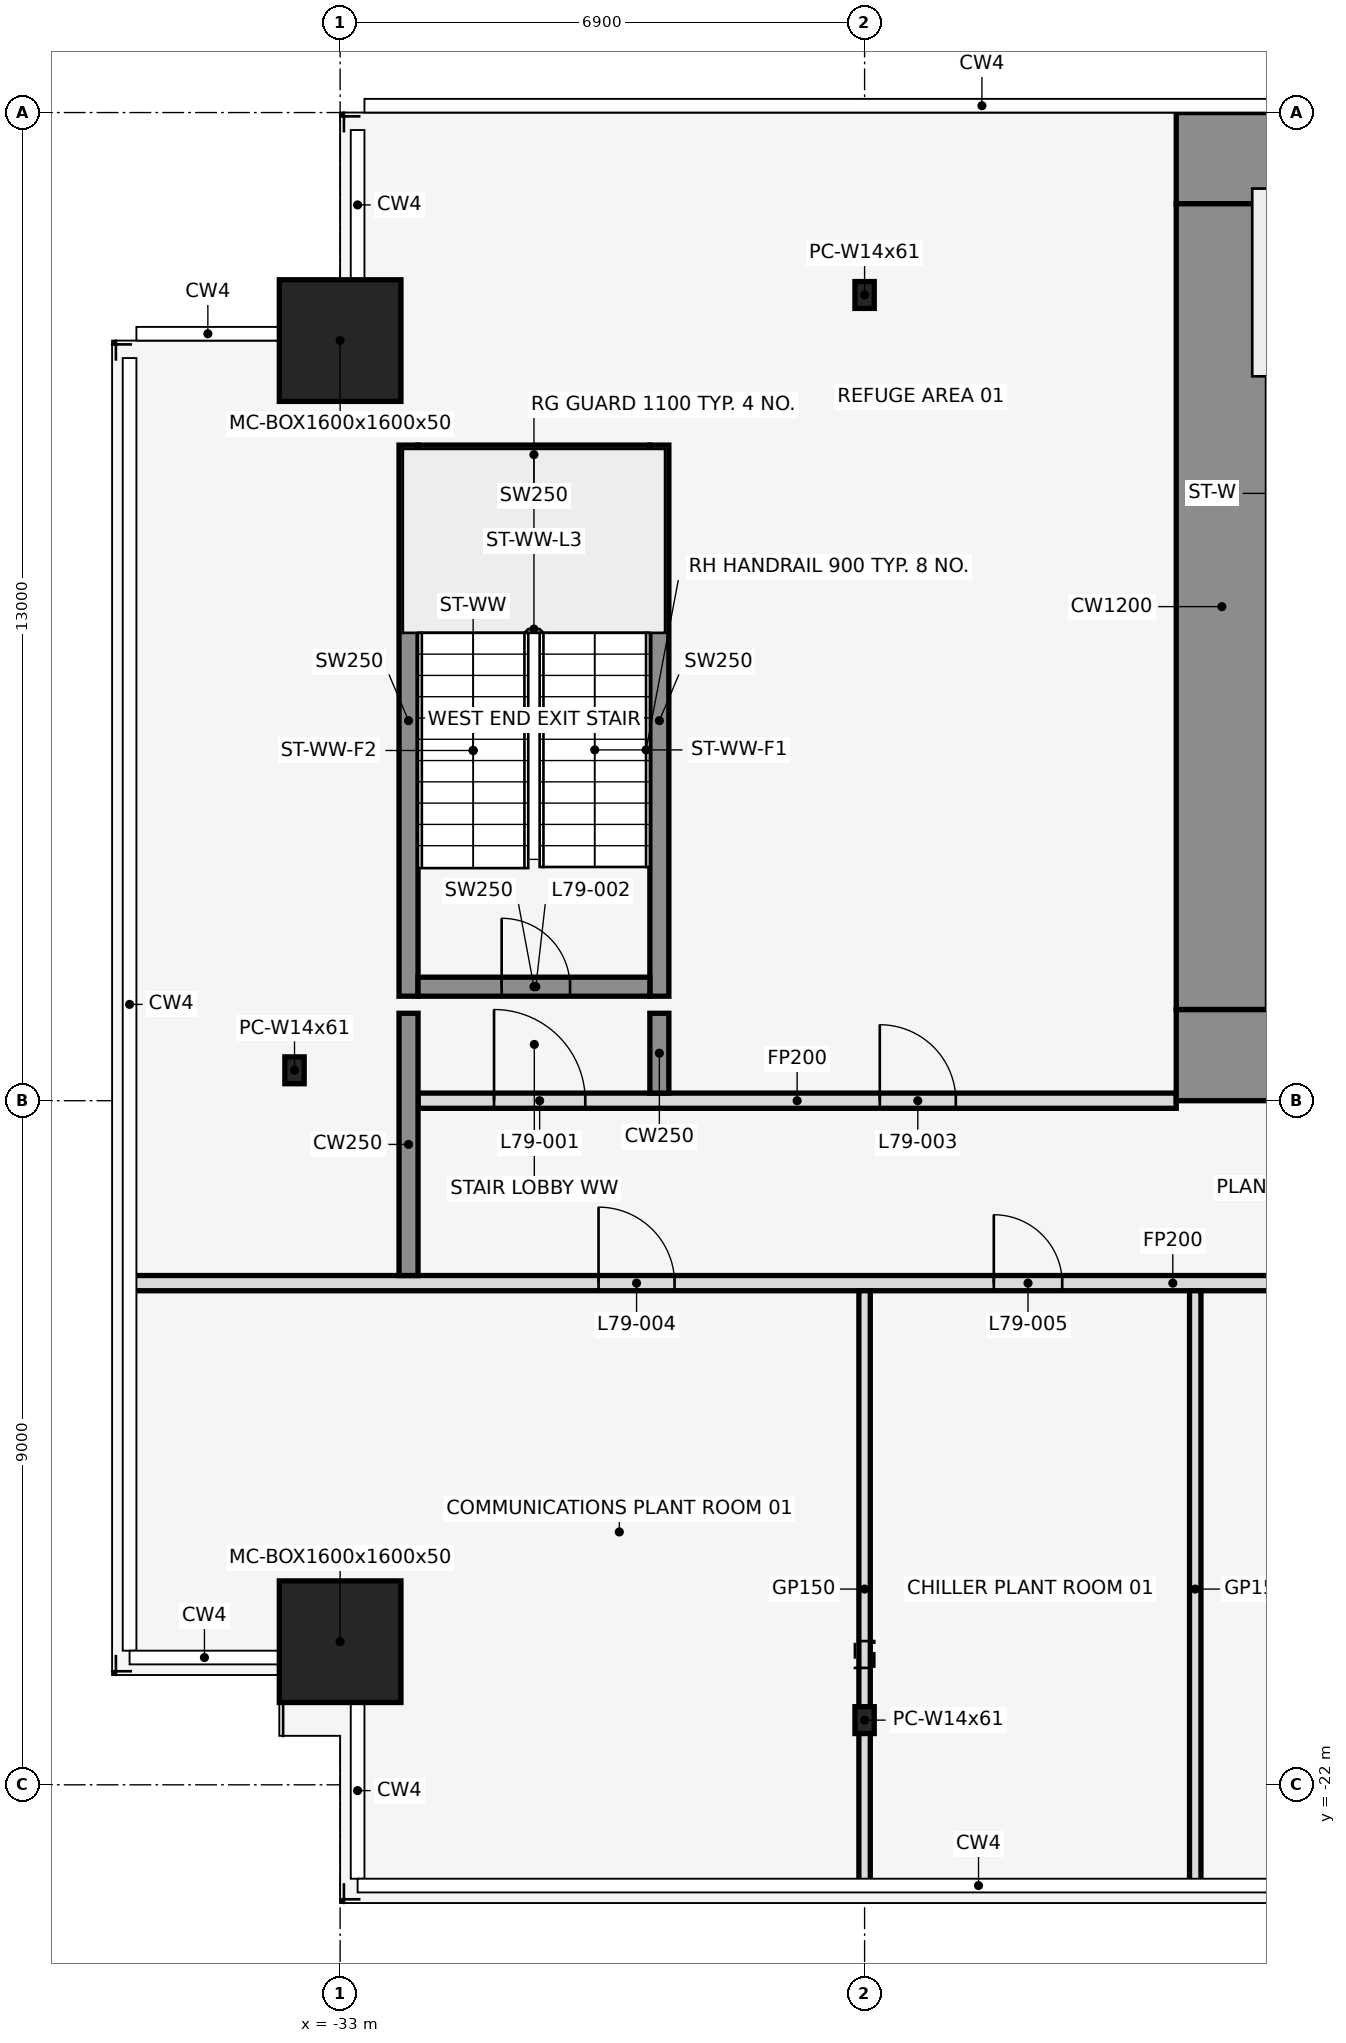
"""IFC4 building model, lengths in metres.
Left out: names, types, materials, properties, quantities, classifications, styles, units other than length and angle.
Written with IfcOpenShell. Run it as: python <this file> out.ifc"""

import sys

from ifc_helpers import new_model, si_unit, direction, frame, frame_2d, origin, origin_2d, place, context, subcontext, project, spatial, rectangle, hollow_rectangle, i_section, extrude, element, fill, save


model = new_model("IFC4")
c1 = context("Model", 3, precision=1e-05, world=origin(), true_north=direction((0.0, 1.0)))
c2 = subcontext(c1, "Body", "Model", "MODEL_VIEW")
j1 = project(units=[si_unit("LENGTHUNIT", "METRE"), si_unit("PLANEANGLEUNIT", "RADIAN")], contexts=[c1])
p1 = place(None, origin())
s1 = spatial("IfcSite", under=j1, at=p1, CompositionType="ELEMENT")
p2 = place(p1, origin())
s2 = spatial("IfcBuilding", under=s1, at=p2, CompositionType="ELEMENT")
p3 = place(p2, frame((0.0, 0.0, 352.4)))
s3 = spatial("IfcBuildingStorey", under=s2, at=p3, CompositionType="ELEMENT", Elevation=352.4)
for number, where, z_axis, x_axis in (
    (1, (-33.0, -20.117, 0.0), (0.0, 0.0, 1.0), (1.0, 0.0, 0.0)),
    (2, (-33.0, -3.0, 0.0), (0.0, 0.0, 1.0), (1.0, 0.0, 0.0)),
):
    element("IfcColumn", number, at=place(p3, frame(where, z_axis=z_axis, x_axis=x_axis)), inside=s3, PredefinedType="COLUMN", context=c2, shape_type="SweptSolid", body=[
        extrude(hollow_rectangle(XDim=1.6, YDim=1.6, WallThickness=0.05, at=origin_2d()), origin(), (0.0, 0.0, 1.0), 4.5),
    ])
p4 = place(p3, frame((-26.1, -21.149, 0.034), z_axis=(0.0, 0.191206783257, 0.981549777666), x_axis=(-1.0, 0.0, 0.0)))
e3 = element("IfcColumn", 3, at=p4, inside=s3, PredefinedType="COLUMN", context=c2, shape_type="SweptSolid", body=[
    extrude(i_section(OverallWidth=0.254, OverallDepth=0.353, WebThickness=0.01, FlangeThickness=0.016, at=origin_2d()), origin(), (0.0, 0.0, 1.0), 4.516),
])
for number, where, z_axis, x_axis in (
    (4, (-26.1, -2.4, 0.0), (0.0, 0.0, 1.0), (1.0, 0.0, 0.0)),
    (5, (-33.6, -12.6, 0.0), (0.0, 0.0, 1.0), (1.0, 0.0, 0.0)),
):
    element("IfcColumn", number, at=place(p3, frame(where, z_axis=z_axis, x_axis=x_axis)), inside=s3, PredefinedType="COLUMN", context=c2, shape_type="SweptSolid", body=[
        extrude(i_section(OverallWidth=0.254, OverallDepth=0.353, WebThickness=0.01, FlangeThickness=0.016, at=origin_2d()), origin(), (0.0, 0.0, 1.0), 4.5),
    ])
for number, where, z_axis, x_axis in (
    (6, (-32.1, -11.625, 0.0), (0.0, 0.0, 1.0), (0.0, 1.0, 0.0)),
    (7, (-28.8, -11.625, 0.0), (0.0, 0.0, 1.0), (0.0, 1.0, 0.0)),
):
    element("IfcWall", number, at=place(p3, frame(where, z_axis=z_axis, x_axis=x_axis)), inside=s3, PredefinedType="SHEAR", context=c2, shape_type="SweptSolid", body=[
        extrude(rectangle(XDim=7.25, YDim=0.25, at=frame_2d((3.625, 0.0))), origin(), (0.0, 0.0, 1.0), 4.5),
    ])
p5 = place(p3, frame((-31.975, -11.5, 0.0), z_axis=(0.0, 0.0, 1.0), x_axis=(1.0, 0.0, 0.0)))
e8 = element("IfcWall", 8, at=p5, inside=s3, PredefinedType="SHEAR", context=c2, shape_type="SweptSolid", body=[
    extrude(rectangle(XDim=3.05, YDim=0.25, at=frame_2d((1.525, 0.0))), origin(), (0.0, 0.0, 1.0), 4.5),
])
p6 = place(p5, frame((1.1, 0.0, 0.0)))
e9 = element("IfcOpeningElement", 9, at=p6, cuts=e8, PredefinedType="OPENING", context=c2, shape_type="SweptSolid", body=[
    extrude(rectangle(XDim=0.9, YDim=2.1, at=frame_2d((0.45, 1.05))), frame((0.0, 0.137, 0.0), z_axis=(0.0, -1.0, 0.0), x_axis=(1.0, 0.0, 0.0)), (0.0, 0.0, 1.0), 0.274),
])
p7 = place(p3, frame((-31.975, -4.5, 0.0), z_axis=(0.0, 0.0, 1.0), x_axis=(1.0, 0.0, 0.0)))
e10 = element("IfcWall", 10, at=p7, inside=s3, PredefinedType="SHEAR", context=c2, shape_type="SweptSolid", body=[
    extrude(rectangle(XDim=3.05, YDim=0.25, at=frame_2d((1.525, 0.0))), origin(), (0.0, 0.0, 1.0), 4.5),
])
p8 = place(p3, frame((-35.79, -15.4, 0.0), z_axis=(0.0, 0.0, 1.0), x_axis=(1.0, 0.0, 0.0)))
e11 = element("IfcWall", 11, at=p8, inside=s3, PredefinedType="PARTITIONING", context=c2, shape_type="SweptSolid", body=[
    extrude(rectangle(XDim=27.49, YDim=0.2, at=frame_2d((13.745, 0.0))), origin(), (0.0, 0.0, 1.0), 3.368),
])
p9 = place(p8, frame((6.19, 0.0, 0.0)))
e12 = element("IfcOpeningElement", 12, at=p9, cuts=e11, PredefinedType="OPENING", context=c2, shape_type="SweptSolid", body=[
    extrude(rectangle(XDim=1.0, YDim=2.1, at=frame_2d((0.5, 1.05))), frame((0.0, 0.112, 0.0), z_axis=(0.0, -1.0, 0.0), x_axis=(1.0, 0.0, 0.0)), (0.0, 0.0, 1.0), 0.224),
])
p10 = place(p8, frame((11.39, 0.0, 0.0)))
e13 = element("IfcOpeningElement", 13, at=p10, cuts=e11, PredefinedType="OPENING", context=c2, shape_type="SweptSolid", body=[
    extrude(rectangle(XDim=0.9, YDim=2.1, at=frame_2d((0.45, 1.05))), frame((0.0, 0.112, 0.0), z_axis=(0.0, -1.0, 0.0), x_axis=(1.0, 0.0, 0.0)), (0.0, 0.0, 1.0), 0.224),
])
p11 = place(p8, frame((20.04, 0.0, 0.0)))
e14 = element("IfcOpeningElement", 14, at=p11, cuts=e11, PredefinedType="OPENING", context=c2, shape_type="SweptSolid", body=[
    extrude(rectangle(XDim=1.0, YDim=2.1, at=frame_2d((0.5, 1.05))), frame((0.0, 0.112, 0.0), z_axis=(0.0, -1.0, 0.0), x_axis=(1.0, 0.0, 0.0)), (0.0, 0.0, 1.0), 0.224),
])
p12 = place(p3, frame((-31.975, -13.0, 0.0), z_axis=(0.0, 0.0, 1.0), x_axis=(1.0, 0.0, 0.0)))
e15 = element("IfcWall", 15, at=p12, inside=s3, PredefinedType="PARTITIONING", context=c2, shape_type="SweptSolid", body=[
    extrude(rectangle(XDim=9.975, YDim=0.2, at=frame_2d((4.988, 0.0))), origin(), (0.0, 0.0, 1.0), 3.368),
])
p13 = place(p12, frame((1.0, 0.0, 0.0)))
e16 = element("IfcOpeningElement", 16, at=p13, cuts=e15, PredefinedType="OPENING", context=c2, shape_type="SweptSolid", body=[
    extrude(rectangle(XDim=1.2, YDim=2.1, at=frame_2d((0.6, 1.05))), frame((0.0, 0.112, 0.0), z_axis=(0.0, -1.0, 0.0), x_axis=(1.0, 0.0, 0.0)), (0.0, 0.0, 1.0), 0.224),
])
p14 = place(p12, frame((6.075, 0.0, 0.0)))
e17 = element("IfcOpeningElement", 17, at=p14, cuts=e15, PredefinedType="OPENING", context=c2, shape_type="SweptSolid", body=[
    extrude(rectangle(XDim=1.0, YDim=2.1, at=frame_2d((0.5, 1.05))), frame((0.0, 0.112, 0.0), z_axis=(0.0, -1.0, 0.0), x_axis=(1.0, 0.0, 0.0)), (0.0, 0.0, 1.0), 0.224),
])
p15 = place(p3, frame((-32.1, -15.3, 0.0), z_axis=(0.0, 0.0, 1.0), x_axis=(0.0, 1.0, 0.0)))
e18 = element("IfcWall", 18, at=p15, inside=s3, PredefinedType="SHEAR", context=c2, shape_type="SweptSolid", body=[
    extrude(rectangle(XDim=3.45, YDim=0.25, at=frame_2d((1.725, 0.0))), origin(), (0.0, 0.0, 1.0), 4.5),
])
p16 = place(p3, frame((-28.8, -12.9, 0.0), z_axis=(0.0, 0.0, 1.0), x_axis=(0.0, 1.0, 0.0)))
e19 = element("IfcWall", 19, at=p16, inside=s3, PredefinedType="SHEAR", context=c2, shape_type="SweptSolid", body=[
    extrude(rectangle(XDim=1.05, YDim=0.25, at=frame_2d((0.525, 0.0))), origin(), (0.0, 0.0, 1.0), 4.5),
])
for number, where, z_axis, x_axis in (
    (20, (-26.1, -23.35, 0.0), (0.0, 0.0, 1.0), (0.0, 1.0, 0.0)),
    (21, (-21.75, -23.35, 0.0), (0.0, 0.0, 1.0), (0.0, 1.0, 0.0)),
):
    element("IfcWall", number, at=place(p3, frame(where, z_axis=z_axis, x_axis=x_axis)), inside=s3, PredefinedType="PARTITIONING", context=c2, shape_type="SweptSolid", body=[
        extrude(rectangle(XDim=7.85, YDim=0.15, at=frame_2d((3.925, 0.0))), origin(), (0.0, 0.0, 1.0), 3.368),
    ])
p17 = place(p3, frame((-22.0, -0.6, 0.0), z_axis=(0.0, 0.0, 1.0), x_axis=(1.0, 0.0, 0.0)))
e22 = element("IfcWall", 22, at=p17, inside=s3, PredefinedType="SHEAR", context=c2, shape_type="SweptSolid", body=[
    extrude(rectangle(XDim=13.7, YDim=1.2, at=frame_2d((6.85, 0.0))), origin(), (0.0, 0.0, 1.0), 4.5),
])
p18 = place(p3, frame((-22.0, -12.4, 0.0), z_axis=(0.0, 0.0, 1.0), x_axis=(1.0, 0.0, 0.0)))
e23 = element("IfcWall", 23, at=p18, inside=s3, PredefinedType="SHEAR", context=c2, shape_type="SweptSolid", body=[
    extrude(rectangle(XDim=13.7, YDim=1.2, at=frame_2d((6.85, 0.0))), origin(), (0.0, 0.0, 1.0), 4.5),
])
p19 = place(p18, frame((2.2, 0.0, 0.0)))
e24 = element("IfcOpeningElement", 24, at=p19, cuts=e23, PredefinedType="OPENING", context=c2, shape_type="SweptSolid", body=[
    extrude(rectangle(XDim=1.2, YDim=2.1, at=frame_2d((0.6, 1.05))), frame((0.0, 0.612, 0.0), z_axis=(0.0, -1.0, 0.0), x_axis=(1.0, 0.0, 0.0)), (0.0, 0.0, 1.0), 1.224),
])
p20 = place(p18, frame((10.75, 0.0, 0.0)))
e25 = element("IfcOpeningElement", 25, at=p20, cuts=e23, PredefinedType="OPENING", context=c2, shape_type="SweptSolid", body=[
    extrude(rectangle(XDim=1.2, YDim=2.1, at=frame_2d((0.6, 1.05))), frame((0.0, 0.612, 0.0), z_axis=(0.0, -1.0, 0.0), x_axis=(1.0, 0.0, 0.0)), (0.0, 0.0, 1.0), 1.224),
])
p21 = place(p18, frame((6.3, 0.0, 0.0)))
e26 = element("IfcOpeningElement", 26, at=p21, cuts=e23, PredefinedType="OPENING", context=c2, shape_type="SweptSolid", body=[
    extrude(rectangle(XDim=1.2, YDim=2.1, at=frame_2d((0.6, 1.05))), frame((0.0, 0.612, 0.0), z_axis=(0.0, -1.0, 0.0), x_axis=(1.0, 0.0, 0.0)), (0.0, 0.0, 1.0), 1.224),
])
p22 = place(p3, frame((-21.4, -11.8, 0.0), z_axis=(0.0, 0.0, 1.0), x_axis=(0.0, 1.0, 0.0)))
e27 = element("IfcWall", 27, at=p22, inside=s3, PredefinedType="SHEAR", context=c2, shape_type="SweptSolid", body=[
    extrude(rectangle(XDim=10.6, YDim=1.2, at=frame_2d((5.3, 0.0))), origin(), (0.0, 0.0, 1.0), 4.5),
])
p23 = place(p13, origin())
e28 = element("IfcDoor", 28, at=p23, inside=s3, OperationType="SINGLE_SWING_LEFT", PredefinedType="DOOR", context=c2, shape_type="SweptSolid", body=[
    extrude(rectangle(XDim=1.2, YDim=2.1, at=frame_2d((0.6, 1.05))), frame((0.0, 0.025, 0.0), z_axis=(0.0, -1.0, 0.0), x_axis=(1.0, 0.0, 0.0)), (0.0, 0.0, 1.0), 0.05),
])
fill(e16, e28)
p24 = place(p6, origin())
e29 = element("IfcDoor", 29, at=p24, inside=s3, OperationType="SINGLE_SWING_LEFT", PredefinedType="DOOR", context=c2, shape_type="SweptSolid", body=[
    extrude(rectangle(XDim=0.9, YDim=2.1, at=frame_2d((0.45, 1.05))), frame((0.0, 0.025, 0.0), z_axis=(0.0, -1.0, 0.0), x_axis=(1.0, 0.0, 0.0)), (0.0, 0.0, 1.0), 0.05),
])
fill(e9, e29)
p25 = place(p14, origin())
e30 = element("IfcDoor", 30, at=p25, inside=s3, OperationType="SINGLE_SWING_RIGHT", PredefinedType="DOOR", context=c2, shape_type="SweptSolid", body=[
    extrude(rectangle(XDim=1.0, YDim=2.1, at=frame_2d((0.5, 1.05))), frame((0.0, 0.025, 0.0), z_axis=(0.0, -1.0, 0.0), x_axis=(1.0, 0.0, 0.0)), (0.0, 0.0, 1.0), 0.05),
])
fill(e17, e30)
p26 = place(p9, frame((1.0, 0.0, 0.0), z_axis=(0.0, 0.0, 1.0), x_axis=(-1.0, 0.0, 0.0)))
e31 = element("IfcDoor", 31, at=p26, inside=s3, OperationType="SINGLE_SWING_LEFT", PredefinedType="DOOR", context=c2, shape_type="SweptSolid", body=[
    extrude(rectangle(XDim=1.0, YDim=2.1, at=frame_2d((0.5, 1.05))), frame((0.0, 0.025, 0.0), z_axis=(0.0, -1.0, 0.0), x_axis=(1.0, 0.0, 0.0)), (0.0, 0.0, 1.0), 0.05),
])
fill(e12, e31)
p27 = place(p10, frame((0.9, 0.0, 0.0), z_axis=(0.0, 0.0, 1.0), x_axis=(-1.0, 0.0, 0.0)))
e32 = element("IfcDoor", 32, at=p27, inside=s3, OperationType="SINGLE_SWING_RIGHT", PredefinedType="DOOR", context=c2, shape_type="SweptSolid", body=[
    extrude(rectangle(XDim=0.9, YDim=2.1, at=frame_2d((0.45, 1.05))), frame((0.0, 0.025, 0.0), z_axis=(0.0, -1.0, 0.0), x_axis=(1.0, 0.0, 0.0)), (0.0, 0.0, 1.0), 0.05),
])
fill(e13, e32)
save(model, sys.argv[1])
